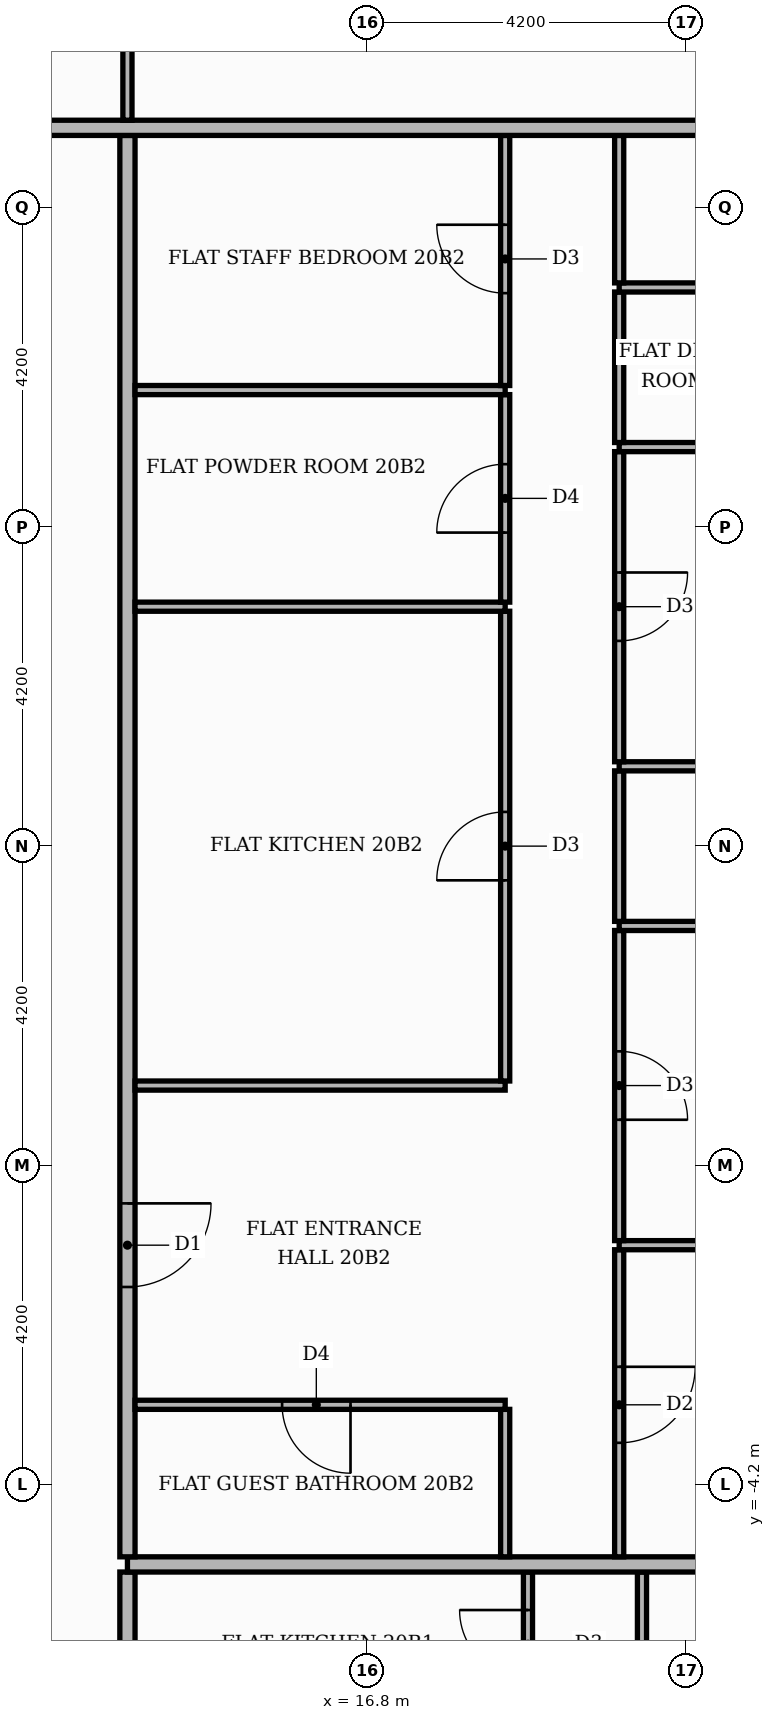
"""IFC4 building model, lengths in metres.
Left out: names, types, materials, properties, quantities, classifications, styles, units other than length and angle.
Written with IfcOpenShell. Run it as: python <this file> out.ifc"""

import sys

from ifc_helpers import new_model, si_unit, direction, frame, frame_2d, origin, place, context, subcontext, project, spatial, rectangle, extrude, element, fill, save


model = new_model("IFC4")
c1 = context("Model", 3, precision=1e-05, world=origin(), true_north=direction((0.0, 1.0)))
c2 = subcontext(c1, "Body", "Model", "MODEL_VIEW")
j1 = project(units=[si_unit("LENGTHUNIT", "METRE"), si_unit("PLANEANGLEUNIT", "RADIAN")], contexts=[c1])
p1 = place(None, origin())
s1 = spatial("IfcSite", under=j1, at=p1, CompositionType="ELEMENT")
p2 = place(p1, origin())
s2 = spatial("IfcBuilding", under=s1, at=p2, CompositionType="ELEMENT")
p3 = place(p2, frame((0.0, 0.0, 87.0)))
s3 = spatial("IfcBuildingStorey", under=s2, at=p3, CompositionType="ELEMENT", Elevation=87.0)
p4 = place(p3, frame((13.65, -13.55, 0.0), z_axis=(0.0, 0.0, 1.0), x_axis=(0.0, 1.0, 0.0)))
e1 = element("IfcWall", 1, at=p4, inside=s3, PredefinedType="PARTITIONING", context=c2, shape_type="SweptSolid", body=[
    extrude(rectangle(XDim=8.2, YDim=0.2, at=frame_2d((4.1, 0.0))), origin(), (0.0, 0.0, 1.0), 3.48),
])
p5 = place(p4, frame((1.45, 0.0, 0.0)))
e2 = element("IfcOpeningElement", 2, at=p5, cuts=e1, PredefinedType="OPENING", context=c2, shape_type="SweptSolid", body=[
    extrude(rectangle(XDim=1.1, YDim=2.4, at=frame_2d((0.55, 1.2))), frame((0.0, 0.11, 0.0), z_axis=(0.0, -1.0, 0.0), x_axis=(1.0, 0.0, 0.0)), (0.0, 0.0, 1.0), 0.22),
])
p6 = place(p3, frame((18.92, -7.29, 0.0), z_axis=(0.0, 0.0, 1.0), x_axis=(0.0, 1.0, 0.0)))
e3 = element("IfcWall", 3, at=p6, inside=s3, PredefinedType="PARTITIONING", context=c2, shape_type="SweptSolid", body=[
    extrude(rectangle(XDim=1.94, YDim=0.12, at=frame_2d((0.97, 0.0))), origin(), (0.0, 0.0, 1.0), 3.48),
])
p7 = place(p6, frame((0.54, 0.0, 0.0)))
e4 = element("IfcOpeningElement", 4, at=p7, cuts=e3, PredefinedType="OPENING", context=c2, shape_type="SweptSolid", body=[
    extrude(rectangle(XDim=0.9, YDim=2.1, at=frame_2d((0.45, 1.05))), frame((0.0, 0.07, 0.0), z_axis=(0.0, -1.0, 0.0), x_axis=(1.0, 0.0, 0.0)), (0.0, 0.0, 1.0), 0.14),
])
p8 = place(p3, frame((20.42, -7.29, 0.0), z_axis=(0.0, 0.0, 1.0), x_axis=(0.0, 1.0, 0.0)))
e5 = element("IfcWall", 5, at=p8, inside=s3, PredefinedType="PARTITIONING", context=c2, shape_type="SweptSolid", body=[
    extrude(rectangle(XDim=1.94, YDim=0.12, at=frame_2d((0.97, 0.0))), origin(), (0.0, 0.0, 1.0), 3.48),
])
p9 = place(p3, frame((13.65, -5.25, 0.0), z_axis=(0.0, 0.0, 1.0), x_axis=(1.0, 0.0, 0.0)))
e6 = element("IfcWall", 6, at=p9, inside=s3, PredefinedType="PARTITIONING", context=c2, shape_type="SweptSolid", body=[
    extrude(rectangle(XDim=11.77, YDim=0.2, at=frame_2d((5.885, 0.0))), origin(), (0.0, 0.0, 1.0), 3.48),
])
p10 = place(p3, frame((13.65, -5.15, 0.0), z_axis=(0.0, 0.0, 1.0), x_axis=(0.0, 1.0, 0.0)))
e7 = element("IfcWall", 7, at=p10, inside=s3, PredefinedType="PARTITIONING", context=c2, shape_type="SweptSolid", body=[
    extrude(rectangle(XDim=18.7, YDim=0.2, at=frame_2d((9.35, 0.0))), origin(), (0.0, 0.0, 1.0), 3.48),
])
p11 = place(p10, frame((3.55, 0.0, 0.0)))
e8 = element("IfcOpeningElement", 8, at=p11, cuts=e7, PredefinedType="OPENING", context=c2, shape_type="SweptSolid", body=[
    extrude(rectangle(XDim=1.1, YDim=2.4, at=frame_2d((0.55, 1.2))), frame((0.0, 0.11, 0.0), z_axis=(0.0, -1.0, 0.0), x_axis=(1.0, 0.0, 0.0)), (0.0, 0.0, 1.0), 0.22),
])
p12 = place(p3, frame((18.62, -5.15, 0.0), z_axis=(0.0, 0.0, 1.0), x_axis=(0.0, 1.0, 0.0)))
e9 = element("IfcWall", 9, at=p12, inside=s3, PredefinedType="PARTITIONING", context=c2, shape_type="SweptSolid", body=[
    extrude(rectangle(XDim=1.94, YDim=0.12, at=frame_2d((0.97, 0.0))), origin(), (0.0, 0.0, 1.0), 3.48),
])
p13 = place(p3, frame((20.12, -5.15, 0.0), z_axis=(0.0, 0.0, 1.0), x_axis=(0.0, 1.0, 0.0)))
e10 = element("IfcWall", 10, at=p13, inside=s3, PredefinedType="PARTITIONING", context=c2, shape_type="SweptSolid", body=[
    extrude(rectangle(XDim=4.04, YDim=0.12, at=frame_2d((2.02, 0.0))), origin(), (0.0, 0.0, 1.0), 3.48),
])
p14 = place(p13, frame((1.5, 0.0, 0.0)))
e11 = element("IfcOpeningElement", 11, at=p14, cuts=e10, PredefinedType="OPENING", context=c2, shape_type="SweptSolid", body=[
    extrude(rectangle(XDim=1.0, YDim=2.1, at=frame_2d((0.5, 1.05))), frame((0.0, 0.07, 0.0), z_axis=(0.0, -1.0, 0.0), x_axis=(1.0, 0.0, 0.0)), (0.0, 0.0, 1.0), 0.14),
])
p15 = place(p3, frame((13.75, -3.15, 0.0), z_axis=(0.0, 0.0, 1.0), x_axis=(1.0, 0.0, 0.0)))
e12 = element("IfcWall", 12, at=p15, inside=s3, PredefinedType="PARTITIONING", context=c2, shape_type="SweptSolid", body=[
    extrude(rectangle(XDim=4.87, YDim=0.12, at=frame_2d((2.435, 0.0))), origin(), (0.0, 0.0, 1.0), 3.48),
])
p16 = place(p15, frame((1.935, 0.0, 0.0)))
e13 = element("IfcOpeningElement", 13, at=p16, cuts=e12, PredefinedType="OPENING", context=c2, shape_type="SweptSolid", body=[
    extrude(rectangle(XDim=0.9, YDim=2.1, at=frame_2d((0.45, 1.05))), frame((0.0, 0.07, 0.0), z_axis=(0.0, -1.0, 0.0), x_axis=(1.0, 0.0, 0.0)), (0.0, 0.0, 1.0), 0.14),
])
p17 = place(p3, frame((20.12, -1.05, 0.0), z_axis=(0.0, 0.0, 1.0), x_axis=(1.0, 0.0, 0.0)))
e14 = element("IfcWall", 14, at=p17, inside=s3, PredefinedType="PARTITIONING", context=c2, shape_type="SweptSolid", body=[
    extrude(rectangle(XDim=5.3, YDim=0.12, at=frame_2d((2.65, 0.0))), origin(), (0.0, 0.0, 1.0), 3.48),
])
p18 = place(p3, frame((20.12, -0.99, 0.0), z_axis=(0.0, 0.0, 1.0), x_axis=(0.0, 1.0, 0.0)))
e15 = element("IfcWall", 15, at=p18, inside=s3, PredefinedType="PARTITIONING", context=c2, shape_type="SweptSolid", body=[
    extrude(rectangle(XDim=4.08, YDim=0.12, at=frame_2d((2.04, 0.0))), origin(), (0.0, 0.0, 1.0), 3.48),
])
p19 = place(p18, frame((1.59, 0.0, 0.0)))
e16 = element("IfcOpeningElement", 16, at=p19, cuts=e15, PredefinedType="OPENING", context=c2, shape_type="SweptSolid", body=[
    extrude(rectangle(XDim=0.9, YDim=2.1, at=frame_2d((0.45, 1.05))), frame((0.0, 0.07, 0.0), z_axis=(0.0, -1.0, 0.0), x_axis=(1.0, 0.0, 0.0)), (0.0, 0.0, 1.0), 0.14),
])
p20 = place(p3, frame((13.75, 1.05, 0.0), z_axis=(0.0, 0.0, 1.0), x_axis=(1.0, 0.0, 0.0)))
e17 = element("IfcWall", 17, at=p20, inside=s3, PredefinedType="PARTITIONING", context=c2, shape_type="SweptSolid", body=[
    extrude(rectangle(XDim=4.87, YDim=0.12, at=frame_2d((2.435, 0.0))), origin(), (0.0, 0.0, 1.0), 3.48),
])
p21 = place(p3, frame((18.62, 1.11, 0.0), z_axis=(0.0, 0.0, 1.0), x_axis=(0.0, 1.0, 0.0)))
e18 = element("IfcWall", 18, at=p21, inside=s3, PredefinedType="PARTITIONING", context=c2, shape_type="SweptSolid", body=[
    extrude(rectangle(XDim=6.18, YDim=0.12, at=frame_2d((3.09, 0.0))), origin(), (0.0, 0.0, 1.0), 3.48),
])
p22 = place(p21, frame((2.64, 0.0, 0.0)))
e19 = element("IfcOpeningElement", 19, at=p22, cuts=e18, PredefinedType="OPENING", context=c2, shape_type="SweptSolid", body=[
    extrude(rectangle(XDim=0.9, YDim=2.1, at=frame_2d((0.45, 1.05))), frame((0.0, 0.07, 0.0), z_axis=(0.0, -1.0, 0.0), x_axis=(1.0, 0.0, 0.0)), (0.0, 0.0, 1.0), 0.14),
])
p23 = place(p3, frame((20.12, 3.15, 0.0), z_axis=(0.0, 0.0, 1.0), x_axis=(1.0, 0.0, 0.0)))
e20 = element("IfcWall", 20, at=p23, inside=s3, PredefinedType="PARTITIONING", context=c2, shape_type="SweptSolid", body=[
    extrude(rectangle(XDim=5.3, YDim=0.12, at=frame_2d((2.65, 0.0))), origin(), (0.0, 0.0, 1.0), 3.48),
])
p24 = place(p23, frame((2.35, 0.0, 0.0)))
e21 = element("IfcOpeningElement", 21, at=p24, cuts=e20, PredefinedType="OPENING", context=c2, shape_type="SweptSolid", body=[
    extrude(rectangle(XDim=0.9, YDim=2.1, at=frame_2d((0.45, 1.05))), frame((0.0, 0.07, 0.0), z_axis=(0.0, -1.0, 0.0), x_axis=(1.0, 0.0, 0.0)), (0.0, 0.0, 1.0), 0.14),
])
p25 = place(p3, frame((20.12, 3.21, 0.0), z_axis=(0.0, 0.0, 1.0), x_axis=(0.0, 1.0, 0.0)))
e22 = element("IfcWall", 22, at=p25, inside=s3, PredefinedType="PARTITIONING", context=c2, shape_type="SweptSolid", body=[
    extrude(rectangle(XDim=1.98, YDim=0.12, at=frame_2d((0.99, 0.0))), origin(), (0.0, 0.0, 1.0), 3.48),
])
p26 = place(p3, frame((20.12, 5.25, 0.0), z_axis=(0.0, 0.0, 1.0), x_axis=(1.0, 0.0, 0.0)))
e23 = element("IfcWall", 23, at=p26, inside=s3, PredefinedType="PARTITIONING", context=c2, shape_type="SweptSolid", body=[
    extrude(rectangle(XDim=5.3, YDim=0.12, at=frame_2d((2.65, 0.0))), origin(), (0.0, 0.0, 1.0), 3.48),
])
p27 = place(p3, frame((20.12, 5.31, 0.0), z_axis=(0.0, 0.0, 1.0), x_axis=(0.0, 1.0, 0.0)))
e24 = element("IfcWall", 24, at=p27, inside=s3, PredefinedType="PARTITIONING", context=c2, shape_type="SweptSolid", body=[
    extrude(rectangle(XDim=4.08, YDim=0.12, at=frame_2d((2.04, 0.0))), origin(), (0.0, 0.0, 1.0), 3.48),
])
p28 = place(p27, frame((1.59, 0.0, 0.0)))
e25 = element("IfcOpeningElement", 25, at=p28, cuts=e24, PredefinedType="OPENING", context=c2, shape_type="SweptSolid", body=[
    extrude(rectangle(XDim=0.9, YDim=2.1, at=frame_2d((0.45, 1.05))), frame((0.0, 0.07, 0.0), z_axis=(0.0, -1.0, 0.0), x_axis=(1.0, 0.0, 0.0)), (0.0, 0.0, 1.0), 0.14),
])
p29 = place(p3, frame((13.75, 7.35, 0.0), z_axis=(0.0, 0.0, 1.0), x_axis=(1.0, 0.0, 0.0)))
e26 = element("IfcWall", 26, at=p29, inside=s3, PredefinedType="PARTITIONING", context=c2, shape_type="SweptSolid", body=[
    extrude(rectangle(XDim=4.87, YDim=0.12, at=frame_2d((2.435, 0.0))), origin(), (0.0, 0.0, 1.0), 3.48),
])
p30 = place(p3, frame((18.62, 7.41, 0.0), z_axis=(0.0, 0.0, 1.0), x_axis=(0.0, 1.0, 0.0)))
e27 = element("IfcWall", 27, at=p30, inside=s3, PredefinedType="PARTITIONING", context=c2, shape_type="SweptSolid", body=[
    extrude(rectangle(XDim=2.73, YDim=0.12, at=frame_2d((1.365, 0.0))), origin(), (0.0, 0.0, 1.0), 3.48),
])
p31 = place(p30, frame((0.915, 0.0, 0.0)))
e28 = element("IfcOpeningElement", 28, at=p31, cuts=e27, PredefinedType="OPENING", context=c2, shape_type="SweptSolid", body=[
    extrude(rectangle(XDim=0.9, YDim=2.1, at=frame_2d((0.45, 1.05))), frame((0.0, 0.07, 0.0), z_axis=(0.0, -1.0, 0.0), x_axis=(1.0, 0.0, 0.0)), (0.0, 0.0, 1.0), 0.14),
])
p32 = place(p3, frame((20.12, 9.45, 0.0), z_axis=(0.0, 0.0, 1.0), x_axis=(1.0, 0.0, 0.0)))
e29 = element("IfcWall", 29, at=p32, inside=s3, PredefinedType="PARTITIONING", context=c2, shape_type="SweptSolid", body=[
    extrude(rectangle(XDim=5.3, YDim=0.12, at=frame_2d((2.65, 0.0))), origin(), (0.0, 0.0, 1.0), 3.48),
])
p33 = place(p32, frame((2.35, 0.0, 0.0)))
e30 = element("IfcOpeningElement", 30, at=p33, cuts=e29, PredefinedType="OPENING", context=c2, shape_type="SweptSolid", body=[
    extrude(rectangle(XDim=0.9, YDim=2.1, at=frame_2d((0.45, 1.05))), frame((0.0, 0.07, 0.0), z_axis=(0.0, -1.0, 0.0), x_axis=(1.0, 0.0, 0.0)), (0.0, 0.0, 1.0), 0.14),
])
p34 = place(p3, frame((20.12, 9.51, 0.0), z_axis=(0.0, 0.0, 1.0), x_axis=(0.0, 1.0, 0.0)))
e31 = element("IfcWall", 31, at=p34, inside=s3, PredefinedType="PARTITIONING", context=c2, shape_type="SweptSolid", body=[
    extrude(rectangle(XDim=1.98, YDim=0.12, at=frame_2d((0.99, 0.0))), origin(), (0.0, 0.0, 1.0), 3.48),
])
p35 = place(p3, frame((13.75, 10.2, 0.0), z_axis=(0.0, 0.0, 1.0), x_axis=(1.0, 0.0, 0.0)))
e32 = element("IfcWall", 32, at=p35, inside=s3, PredefinedType="PARTITIONING", context=c2, shape_type="SweptSolid", body=[
    extrude(rectangle(XDim=4.87, YDim=0.12, at=frame_2d((2.435, 0.0))), origin(), (0.0, 0.0, 1.0), 3.48),
])
p36 = place(p3, frame((18.62, 10.26, 0.0), z_axis=(0.0, 0.0, 1.0), x_axis=(0.0, 1.0, 0.0)))
e33 = element("IfcWall", 33, at=p36, inside=s3, PredefinedType="PARTITIONING", context=c2, shape_type="SweptSolid", body=[
    extrude(rectangle(XDim=3.29, YDim=0.12, at=frame_2d((1.645, 0.0))), origin(), (0.0, 0.0, 1.0), 3.48),
])
p37 = place(p36, frame((1.215, 0.0, 0.0)))
e34 = element("IfcOpeningElement", 34, at=p37, cuts=e33, PredefinedType="OPENING", context=c2, shape_type="SweptSolid", body=[
    extrude(rectangle(XDim=0.9, YDim=2.1, at=frame_2d((0.45, 1.05))), frame((0.0, 0.07, 0.0), z_axis=(0.0, -1.0, 0.0), x_axis=(1.0, 0.0, 0.0)), (0.0, 0.0, 1.0), 0.14),
])
p38 = place(p3, frame((20.12, 11.55, 0.0), z_axis=(0.0, 0.0, 1.0), x_axis=(1.0, 0.0, 0.0)))
e35 = element("IfcWall", 35, at=p38, inside=s3, PredefinedType="PARTITIONING", context=c2, shape_type="SweptSolid", body=[
    extrude(rectangle(XDim=5.3, YDim=0.12, at=frame_2d((2.65, 0.0))), origin(), (0.0, 0.0, 1.0), 3.48),
])
p39 = place(p38, frame((2.35, 0.0, 0.0)))
e36 = element("IfcOpeningElement", 36, at=p39, cuts=e35, PredefinedType="OPENING", context=c2, shape_type="SweptSolid", body=[
    extrude(rectangle(XDim=0.9, YDim=2.1, at=frame_2d((0.45, 1.05))), frame((0.0, 0.07, 0.0), z_axis=(0.0, -1.0, 0.0), x_axis=(1.0, 0.0, 0.0)), (0.0, 0.0, 1.0), 0.14),
])
p40 = place(p3, frame((20.12, 11.61, 0.0), z_axis=(0.0, 0.0, 1.0), x_axis=(0.0, 1.0, 0.0)))
e37 = element("IfcWall", 37, at=p40, inside=s3, PredefinedType="PARTITIONING", context=c2, shape_type="SweptSolid", body=[
    extrude(rectangle(XDim=1.94, YDim=0.12, at=frame_2d((0.97, 0.0))), origin(), (0.0, 0.0, 1.0), 3.48),
])
p41 = place(p3, frame((-13.65, 13.65, 0.0), z_axis=(0.0, 0.0, 1.0), x_axis=(1.0, 0.0, 0.0)))
e38 = element("IfcWall", 38, at=p41, inside=s3, PredefinedType="PARTITIONING", context=c2, shape_type="SweptSolid", body=[
    extrude(rectangle(XDim=39.07, YDim=0.2, at=frame_2d((19.535, 0.0))), origin(), (0.0, 0.0, 1.0), 3.48),
])
p42 = place(p41, frame((23.6, 0.0, 0.0)))
e39 = element("IfcOpeningElement", 39, at=p42, cuts=e38, PredefinedType="OPENING", context=c2, shape_type="SweptSolid", body=[
    extrude(rectangle(XDim=1.1, YDim=2.4, at=frame_2d((0.55, 1.2))), frame((0.0, 0.11, 0.0), z_axis=(0.0, -1.0, 0.0), x_axis=(1.0, 0.0, 0.0)), (0.0, 0.0, 1.0), 0.22),
])
p43 = place(p3, frame((13.65, 13.75, 0.0), z_axis=(0.0, 0.0, 1.0), x_axis=(0.0, 1.0, 0.0)))
e40 = element("IfcWall", 40, at=p43, inside=s3, PredefinedType="PARTITIONING", context=c2, shape_type="SweptSolid", body=[
    extrude(rectangle(XDim=6.01, YDim=0.12, at=frame_2d((3.005, 0.0))), origin(), (0.0, 0.0, 1.0), 3.48),
])
p44 = place(p43, frame((2.535, 0.0, 0.0)))
e41 = element("IfcOpeningElement", 41, at=p44, cuts=e40, PredefinedType="OPENING", context=c2, shape_type="SweptSolid", body=[
    extrude(rectangle(XDim=0.9, YDim=2.1, at=frame_2d((0.45, 1.05))), frame((0.0, 0.07, 0.0), z_axis=(0.0, -1.0, 0.0), x_axis=(1.0, 0.0, 0.0)), (0.0, 0.0, 1.0), 0.14),
])
p45 = place(p7, origin())
e42 = element("IfcDoor", 42, at=p45, inside=s3, OperationType="SINGLE_SWING_RIGHT", PredefinedType="DOOR", context=c2, shape_type="SweptSolid", body=[
    extrude(rectangle(XDim=0.9, YDim=2.1, at=frame_2d((0.45, 1.05))), frame((0.0, 0.025, 0.0), z_axis=(0.0, -1.0, 0.0), x_axis=(1.0, 0.0, 0.0)), (0.0, 0.0, 1.0), 0.05),
])
fill(e4, e42)
p46 = place(p11, frame((1.1, 0.0, 0.0), z_axis=(0.0, 0.0, 1.0), x_axis=(-1.0, 0.0, 0.0)))
e43 = element("IfcDoor", 43, at=p46, inside=s3, OperationType="SINGLE_SWING_RIGHT", PredefinedType="DOOR", context=c2, shape_type="SweptSolid", body=[
    extrude(rectangle(XDim=1.1, YDim=2.4, at=frame_2d((0.55, 1.2))), frame((0.0, 0.025, 0.0), z_axis=(0.0, -1.0, 0.0), x_axis=(1.0, 0.0, 0.0)), (0.0, 0.0, 1.0), 0.05),
])
fill(e8, e43)
p47 = place(p16, frame((0.9, 0.0, 0.0), z_axis=(0.0, 0.0, 1.0), x_axis=(-1.0, 0.0, 0.0)))
e44 = element("IfcDoor", 44, at=p47, inside=s3, OperationType="SINGLE_SWING_RIGHT", PredefinedType="DOOR", context=c2, shape_type="SweptSolid", body=[
    extrude(rectangle(XDim=0.9, YDim=2.1, at=frame_2d((0.45, 1.05))), frame((0.0, 0.025, 0.0), z_axis=(0.0, -1.0, 0.0), x_axis=(1.0, 0.0, 0.0)), (0.0, 0.0, 1.0), 0.05),
])
fill(e13, e44)
p48 = place(p22, origin())
e45 = element("IfcDoor", 45, at=p48, inside=s3, OperationType="SINGLE_SWING_LEFT", PredefinedType="DOOR", context=c2, shape_type="SweptSolid", body=[
    extrude(rectangle(XDim=0.9, YDim=2.1, at=frame_2d((0.45, 1.05))), frame((0.0, 0.025, 0.0), z_axis=(0.0, -1.0, 0.0), x_axis=(1.0, 0.0, 0.0)), (0.0, 0.0, 1.0), 0.05),
])
fill(e19, e45)
p49 = place(p31, origin())
e46 = element("IfcDoor", 46, at=p49, inside=s3, OperationType="SINGLE_SWING_LEFT", PredefinedType="DOOR", context=c2, shape_type="SweptSolid", body=[
    extrude(rectangle(XDim=0.9, YDim=2.1, at=frame_2d((0.45, 1.05))), frame((0.0, 0.025, 0.0), z_axis=(0.0, -1.0, 0.0), x_axis=(1.0, 0.0, 0.0)), (0.0, 0.0, 1.0), 0.05),
])
fill(e28, e46)
p50 = place(p37, origin())
e47 = element("IfcDoor", 47, at=p50, inside=s3, OperationType="SINGLE_SWING_RIGHT", PredefinedType="DOOR", context=c2, shape_type="SweptSolid", body=[
    extrude(rectangle(XDim=0.9, YDim=2.1, at=frame_2d((0.45, 1.05))), frame((0.0, 0.025, 0.0), z_axis=(0.0, -1.0, 0.0), x_axis=(1.0, 0.0, 0.0)), (0.0, 0.0, 1.0), 0.05),
])
fill(e34, e47)
p51 = place(p14, frame((1.0, 0.0, 0.0), z_axis=(0.0, 0.0, 1.0), x_axis=(-1.0, 0.0, 0.0)))
e48 = element("IfcDoor", 48, at=p51, inside=s3, OperationType="SINGLE_SWING_RIGHT", PredefinedType="DOOR", context=c2, shape_type="SweptSolid", body=[
    extrude(rectangle(XDim=1.0, YDim=2.1, at=frame_2d((0.5, 1.05))), frame((0.0, 0.025, 0.0), z_axis=(0.0, -1.0, 0.0), x_axis=(1.0, 0.0, 0.0)), (0.0, 0.0, 1.0), 0.05),
])
fill(e11, e48)
p52 = place(p19, frame((0.9, 0.0, 0.0), z_axis=(0.0, 0.0, 1.0), x_axis=(-1.0, 0.0, 0.0)))
e49 = element("IfcDoor", 49, at=p52, inside=s3, OperationType="SINGLE_SWING_LEFT", PredefinedType="DOOR", context=c2, shape_type="SweptSolid", body=[
    extrude(rectangle(XDim=0.9, YDim=2.1, at=frame_2d((0.45, 1.05))), frame((0.0, 0.025, 0.0), z_axis=(0.0, -1.0, 0.0), x_axis=(1.0, 0.0, 0.0)), (0.0, 0.0, 1.0), 0.05),
])
fill(e16, e49)
p53 = place(p28, frame((0.9, 0.0, 0.0), z_axis=(0.0, 0.0, 1.0), x_axis=(-1.0, 0.0, 0.0)))
e50 = element("IfcDoor", 50, at=p53, inside=s3, OperationType="SINGLE_SWING_RIGHT", PredefinedType="DOOR", context=c2, shape_type="SweptSolid", body=[
    extrude(rectangle(XDim=0.9, YDim=2.1, at=frame_2d((0.45, 1.05))), frame((0.0, 0.025, 0.0), z_axis=(0.0, -1.0, 0.0), x_axis=(1.0, 0.0, 0.0)), (0.0, 0.0, 1.0), 0.05),
])
fill(e25, e50)
save(model, sys.argv[1])
